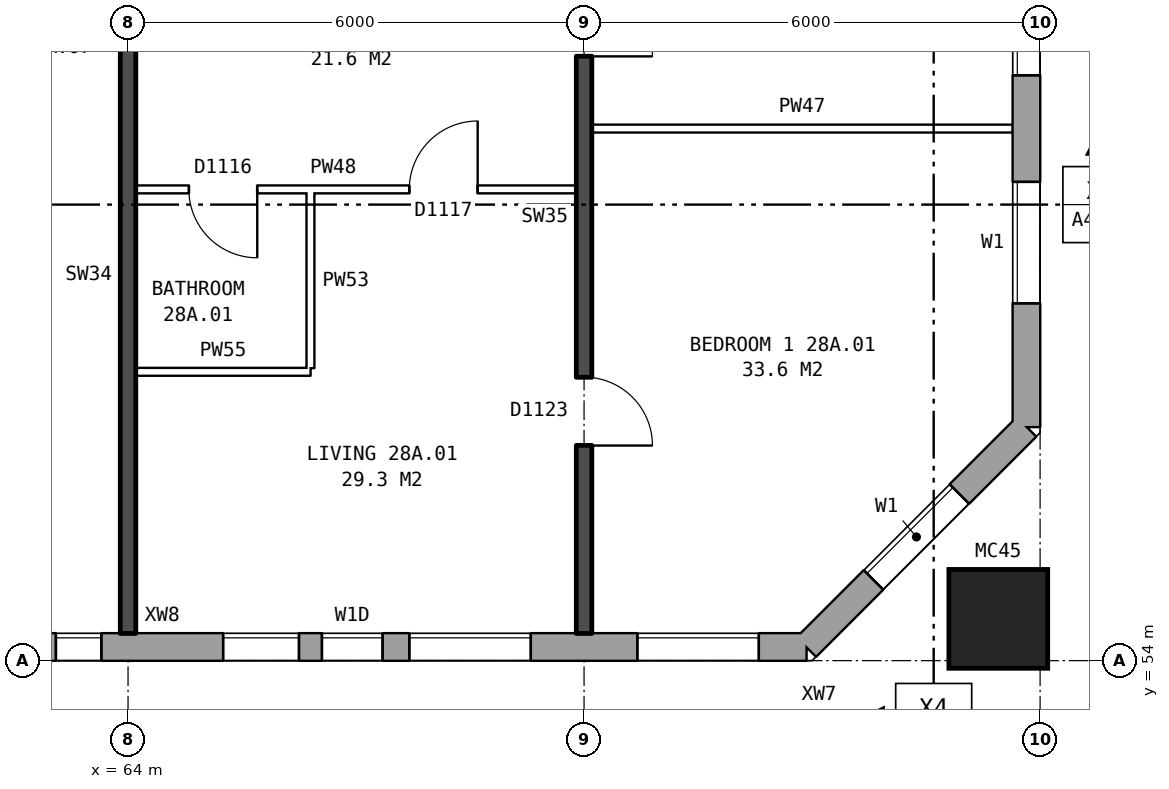
"""IFC4 building model, lengths in metres.
Left out: names, types, materials, properties, quantities, classifications, styles, units other than length and angle.
Written with IfcOpenShell. Run it as: python <this file> out.ifc"""

import sys

from ifc_helpers import new_model, si_unit, direction, frame, frame_2d, origin, origin_2d, place, context, subcontext, project, spatial, rectangle, hollow_rectangle, extrude, element, fill, save


model = new_model("IFC4")
c1 = context("Model", 3, precision=1e-05, world=origin(), true_north=direction((0.0, 1.0)))
c2 = subcontext(c1, "Body", "Model", "MODEL_VIEW")
j1 = project(units=[si_unit("LENGTHUNIT", "METRE"), si_unit("PLANEANGLEUNIT", "RADIAN")], contexts=[c1])
p1 = place(None, origin())
s1 = spatial("IfcSite", under=j1, at=p1, CompositionType="ELEMENT")
p2 = place(p1, origin())
s2 = spatial("IfcBuilding", under=s1, at=p2, CompositionType="ELEMENT")
p3 = place(p2, frame((0.0, 0.0, 102.6)))
s3 = spatial("IfcBuildingStorey", under=s2, at=p3, CompositionType="ELEMENT", Elevation=102.6)
p4 = place(p3, frame((75.45, 54.55, 0.0), z_axis=(0.0, 0.0, 1.0), x_axis=(1.0, 0.0, 0.0)))
e1 = element("IfcColumn", 1, at=p4, inside=s3, PredefinedType="COLUMN", context=c2, shape_type="SweptSolid", body=[
    extrude(hollow_rectangle(XDim=1.3, YDim=1.3, WallThickness=0.07, at=origin_2d()), origin(), (0.0, 0.0, 1.0), 3.1),
])
p5 = place(p3, frame((28.075, 54.18, 0.0), z_axis=(0.0, 0.0, 1.0), x_axis=(1.0, 0.0, 0.0)))
e2 = element("IfcWall", 2, at=p5, inside=s3, PredefinedType="STANDARD", context=c2, shape_type="SweptSolid", body=[
    extrude(rectangle(XDim=44.851, YDim=0.36, at=frame_2d((22.425, 0.0))), origin(), (0.0, 0.0, 1.0), 2.85),
])
p6 = place(p5, frame((0.625, 0.0, 0.8)))
e3 = element("IfcOpeningElement", 3, at=p6, cuts=e2, PredefinedType="OPENING", context=c2, shape_type="SweptSolid", body=[
    extrude(rectangle(XDim=1.6, YDim=1.8, at=frame_2d((0.8, 0.9))), frame((0.0, 0.19, 0.0), z_axis=(0.0, -1.0, 0.0), x_axis=(1.0, 0.0, 0.0)), (0.0, 0.0, 1.0), 0.38),
])
p7 = place(p5, frame((3.625, 0.0, 0.8)))
e4 = element("IfcOpeningElement", 4, at=p7, cuts=e2, PredefinedType="OPENING", context=c2, shape_type="SweptSolid", body=[
    extrude(rectangle(XDim=1.6, YDim=1.8, at=frame_2d((0.8, 0.9))), frame((0.0, 0.19, 0.0), z_axis=(0.0, -1.0, 0.0), x_axis=(1.0, 0.0, 0.0)), (0.0, 0.0, 1.0), 0.38),
])
p8 = place(p5, frame((6.125, 0.0, 1.0)))
e5 = element("IfcOpeningElement", 5, at=p8, cuts=e2, PredefinedType="OPENING", context=c2, shape_type="SweptSolid", body=[
    extrude(rectangle(XDim=0.6, YDim=1.5, at=frame_2d((0.3, 0.75))), frame((0.0, 0.19, 0.0), z_axis=(0.0, -1.0, 0.0), x_axis=(1.0, 0.0, 0.0)), (0.0, 0.0, 1.0), 0.38),
])
p9 = place(p5, frame((7.025, 0.0, 1.7)))
e6 = element("IfcOpeningElement", 6, at=p9, cuts=e2, PredefinedType="OPENING", context=c2, shape_type="SweptSolid", body=[
    extrude(rectangle(XDim=0.6, YDim=0.9, at=frame_2d((0.3, 0.45))), frame((0.0, 0.19, 0.0), z_axis=(0.0, -1.0, 0.0), x_axis=(1.0, 0.0, 0.0)), (0.0, 0.0, 1.0), 0.38),
])
p10 = place(p5, frame((12.625, 0.0, 0.8)))
e7 = element("IfcOpeningElement", 7, at=p10, cuts=e2, PredefinedType="OPENING", context=c2, shape_type="SweptSolid", body=[
    extrude(rectangle(XDim=1.6, YDim=1.8, at=frame_2d((0.8, 0.9))), frame((0.0, 0.19, 0.0), z_axis=(0.0, -1.0, 0.0), x_axis=(1.0, 0.0, 0.0)), (0.0, 0.0, 1.0), 0.38),
])
p11 = place(p5, frame((15.625, 0.0, 0.8)))
e8 = element("IfcOpeningElement", 8, at=p11, cuts=e2, PredefinedType="OPENING", context=c2, shape_type="SweptSolid", body=[
    extrude(rectangle(XDim=1.6, YDim=1.8, at=frame_2d((0.8, 0.9))), frame((0.0, 0.19, 0.0), z_axis=(0.0, -1.0, 0.0), x_axis=(1.0, 0.0, 0.0)), (0.0, 0.0, 1.0), 0.38),
])
p12 = place(p5, frame((18.625, 0.0, 0.8)))
e9 = element("IfcOpeningElement", 9, at=p12, cuts=e2, PredefinedType="OPENING", context=c2, shape_type="SweptSolid", body=[
    extrude(rectangle(XDim=1.6, YDim=1.8, at=frame_2d((0.8, 0.9))), frame((0.0, 0.19, 0.0), z_axis=(0.0, -1.0, 0.0), x_axis=(1.0, 0.0, 0.0)), (0.0, 0.0, 1.0), 0.38),
])
p13 = place(p5, frame((21.625, 0.0, 0.8)))
e10 = element("IfcOpeningElement", 10, at=p13, cuts=e2, PredefinedType="OPENING", context=c2, shape_type="SweptSolid", body=[
    extrude(rectangle(XDim=1.6, YDim=1.8, at=frame_2d((0.8, 0.9))), frame((0.0, 0.19, 0.0), z_axis=(0.0, -1.0, 0.0), x_axis=(1.0, 0.0, 0.0)), (0.0, 0.0, 1.0), 0.38),
])
p14 = place(p5, frame((24.625, 0.0, 0.8)))
e11 = element("IfcOpeningElement", 11, at=p14, cuts=e2, PredefinedType="OPENING", context=c2, shape_type="SweptSolid", body=[
    extrude(rectangle(XDim=1.6, YDim=1.8, at=frame_2d((0.8, 0.9))), frame((0.0, 0.19, 0.0), z_axis=(0.0, -1.0, 0.0), x_axis=(1.0, 0.0, 0.0)), (0.0, 0.0, 1.0), 0.38),
])
p15 = place(p5, frame((27.625, 0.0, 0.8)))
e12 = element("IfcOpeningElement", 12, at=p15, cuts=e2, PredefinedType="OPENING", context=c2, shape_type="SweptSolid", body=[
    extrude(rectangle(XDim=1.6, YDim=1.8, at=frame_2d((0.8, 0.9))), frame((0.0, 0.19, 0.0), z_axis=(0.0, -1.0, 0.0), x_axis=(1.0, 0.0, 0.0)), (0.0, 0.0, 1.0), 0.38),
])
p16 = place(p5, frame((30.625, 0.0, 0.8)))
e13 = element("IfcOpeningElement", 13, at=p16, cuts=e2, PredefinedType="OPENING", context=c2, shape_type="SweptSolid", body=[
    extrude(rectangle(XDim=1.6, YDim=1.8, at=frame_2d((0.8, 0.9))), frame((0.0, 0.19, 0.0), z_axis=(0.0, -1.0, 0.0), x_axis=(1.0, 0.0, 0.0)), (0.0, 0.0, 1.0), 0.38),
])
p17 = place(p5, frame((33.075, 0.0, 0.8)))
e14 = element("IfcOpeningElement", 14, at=p17, cuts=e2, PredefinedType="OPENING", context=c2, shape_type="SweptSolid", body=[
    extrude(rectangle(XDim=1.6, YDim=1.8, at=frame_2d((0.8, 0.9))), frame((0.0, 0.19, 0.0), z_axis=(0.0, -1.0, 0.0), x_axis=(1.0, 0.0, 0.0)), (0.0, 0.0, 1.0), 0.38),
])
p18 = place(p5, frame((37.175, 0.0, 1.7)))
e15 = element("IfcOpeningElement", 15, at=p18, cuts=e2, PredefinedType="OPENING", context=c2, shape_type="SweptSolid", body=[
    extrude(rectangle(XDim=1.0, YDim=0.9, at=frame_2d((0.5, 0.45))), frame((0.0, 0.19, 0.0), z_axis=(0.0, -1.0, 0.0), x_axis=(1.0, 0.0, 0.0)), (0.0, 0.0, 1.0), 0.38),
])
p19 = place(p5, frame((39.625, 0.0, 0.8)))
e16 = element("IfcOpeningElement", 16, at=p19, cuts=e2, PredefinedType="OPENING", context=c2, shape_type="SweptSolid", body=[
    extrude(rectangle(XDim=1.6, YDim=1.8, at=frame_2d((0.8, 0.9))), frame((0.0, 0.19, 0.0), z_axis=(0.0, -1.0, 0.0), x_axis=(1.0, 0.0, 0.0)), (0.0, 0.0, 1.0), 0.38),
])
p20 = place(p5, frame((42.625, 0.0, 0.8)))
e17 = element("IfcOpeningElement", 17, at=p20, cuts=e2, PredefinedType="OPENING", context=c2, shape_type="SweptSolid", body=[
    extrude(rectangle(XDim=1.6, YDim=1.8, at=frame_2d((0.8, 0.9))), frame((0.0, 0.19, 0.0), z_axis=(0.0, -1.0, 0.0), x_axis=(1.0, 0.0, 0.0)), (0.0, 0.0, 1.0), 0.38),
])
p21 = place(p5, frame((8.925, 0.0, 0.8)))
e18 = element("IfcOpeningElement", 18, at=p21, cuts=e2, PredefinedType="OPENING", context=c2, shape_type="SweptSolid", body=[
    extrude(rectangle(XDim=1.0, YDim=0.9, at=frame_2d((0.5, 0.45))), frame((0.0, 0.19, 0.0), z_axis=(0.0, -1.0, 0.0), x_axis=(1.0, 0.0, 0.0)), (0.0, 0.0, 1.0), 0.38),
])
p22 = place(p5, frame((10.225, 0.0, 0.8)))
e19 = element("IfcOpeningElement", 19, at=p22, cuts=e2, PredefinedType="OPENING", context=c2, shape_type="SweptSolid", body=[
    extrude(rectangle(XDim=1.4, YDim=1.8, at=frame_2d((0.7, 0.9))), frame((0.0, 0.19, 0.0), z_axis=(0.0, -1.0, 0.0), x_axis=(1.0, 0.0, 0.0)), (0.0, 0.0, 1.0), 0.38),
])
p23 = place(p5, frame((34.975, 0.0, 0.8)))
e20 = element("IfcOpeningElement", 20, at=p23, cuts=e2, PredefinedType="OPENING", context=c2, shape_type="SweptSolid", body=[
    extrude(rectangle(XDim=0.6, YDim=0.9, at=frame_2d((0.3, 0.45))), frame((0.0, 0.19, 0.0), z_axis=(0.0, -1.0, 0.0), x_axis=(1.0, 0.0, 0.0)), (0.0, 0.0, 1.0), 0.38),
])
p24 = place(p5, frame((38.475, 0.0, 0.8)))
e21 = element("IfcOpeningElement", 21, at=p24, cuts=e2, PredefinedType="OPENING", context=c2, shape_type="SweptSolid", body=[
    extrude(rectangle(XDim=0.8, YDim=1.8, at=frame_2d((0.4, 0.9))), frame((0.0, 0.19, 0.0), z_axis=(0.0, -1.0, 0.0), x_axis=(1.0, 0.0, 0.0)), (0.0, 0.0, 1.0), 0.38),
])
p25 = place(p3, frame((72.925, 54.18, 0.0), z_axis=(0.0, 0.0, 1.0), x_axis=(0.707106781187, 0.707106781187, 0.0)))
e22 = element("IfcWall", 22, at=p25, inside=s3, PredefinedType="STANDARD", context=c2, shape_type="SweptSolid", body=[
    extrude(rectangle(XDim=4.094, YDim=0.36, at=frame_2d((2.047, 0.0))), origin(), (0.0, 0.0, 1.0), 2.85),
])
p26 = place(p25, frame((1.247, 0.0, 0.8)))
e23 = element("IfcOpeningElement", 23, at=p26, cuts=e22, PredefinedType="OPENING", context=c2, shape_type="SweptSolid", body=[
    extrude(rectangle(XDim=1.6, YDim=1.8, at=frame_2d((0.8, 0.9))), frame((0.0, 0.19, 0.0), z_axis=(0.0, -1.0, 0.0), x_axis=(1.0, 0.0, 0.0)), (0.0, 0.0, 1.0), 0.38),
])
p27 = place(p3, frame((75.82, 57.075, 0.0), z_axis=(0.0, 0.0, 1.0), x_axis=(0.0, 1.0, 0.0)))
e24 = element("IfcWall", 24, at=p27, inside=s3, PredefinedType="STANDARD", context=c2, shape_type="SweptSolid", body=[
    extrude(rectangle(XDim=25.851, YDim=0.36, at=frame_2d((12.925, 0.0))), origin(), (0.0, 0.0, 1.0), 2.85),
])
p28 = place(p27, frame((1.625, 0.0, 0.8)))
e25 = element("IfcOpeningElement", 25, at=p28, cuts=e24, PredefinedType="OPENING", context=c2, shape_type="SweptSolid", body=[
    extrude(rectangle(XDim=1.6, YDim=1.8, at=frame_2d((0.8, 0.9))), frame((0.0, 0.19, 0.0), z_axis=(0.0, -1.0, 0.0), x_axis=(1.0, 0.0, 0.0)), (0.0, 0.0, 1.0), 0.38),
])
p29 = place(p27, frame((4.625, 0.0, 0.8)))
e26 = element("IfcOpeningElement", 26, at=p29, cuts=e24, PredefinedType="OPENING", context=c2, shape_type="SweptSolid", body=[
    extrude(rectangle(XDim=1.6, YDim=1.8, at=frame_2d((0.8, 0.9))), frame((0.0, 0.19, 0.0), z_axis=(0.0, -1.0, 0.0), x_axis=(1.0, 0.0, 0.0)), (0.0, 0.0, 1.0), 0.38),
])
p30 = place(p27, frame((19.625, 0.0, 0.8)))
e27 = element("IfcOpeningElement", 27, at=p30, cuts=e24, PredefinedType="OPENING", context=c2, shape_type="SweptSolid", body=[
    extrude(rectangle(XDim=1.6, YDim=1.8, at=frame_2d((0.8, 0.9))), frame((0.0, 0.19, 0.0), z_axis=(0.0, -1.0, 0.0), x_axis=(1.0, 0.0, 0.0)), (0.0, 0.0, 1.0), 0.38),
])
p31 = place(p27, frame((22.625, 0.0, 0.8)))
e28 = element("IfcOpeningElement", 28, at=p31, cuts=e24, PredefinedType="OPENING", context=c2, shape_type="SweptSolid", body=[
    extrude(rectangle(XDim=1.6, YDim=1.8, at=frame_2d((0.8, 0.9))), frame((0.0, 0.19, 0.0), z_axis=(0.0, -1.0, 0.0), x_axis=(1.0, 0.0, 0.0)), (0.0, 0.0, 1.0), 0.38),
])
p32 = place(p3, frame((64.1, 57.8, 0.0), z_axis=(0.0, 0.0, 1.0), x_axis=(1.0, 0.0, 0.0)))
e29 = element("IfcWall", 29, at=p32, inside=s3, PredefinedType="PARTITIONING", context=c2, shape_type="SweptSolid", body=[
    extrude(rectangle(XDim=2.3, YDim=0.1, at=frame_2d((1.15, 0.0))), origin(), (0.0, 0.0, 1.0), 2.85),
])
p33 = place(p3, frame((64.1, 60.2, 0.0), z_axis=(0.0, 0.0, 1.0), x_axis=(1.0, 0.0, 0.0)))
e30 = element("IfcWall", 30, at=p33, inside=s3, PredefinedType="PARTITIONING", context=c2, shape_type="SweptSolid", body=[
    extrude(rectangle(XDim=5.8, YDim=0.1, at=frame_2d((2.9, 0.0))), origin(), (0.0, 0.0, 1.0), 2.85),
])
p34 = place(p33, frame((3.6, 0.0, 0.0)))
e31 = element("IfcOpeningElement", 31, at=p34, cuts=e30, PredefinedType="OPENING", context=c2, shape_type="SweptSolid", body=[
    extrude(rectangle(XDim=0.9, YDim=2.1, at=frame_2d((0.45, 1.05))), frame((0.0, 0.06, 0.0), z_axis=(0.0, -1.0, 0.0), x_axis=(1.0, 0.0, 0.0)), (0.0, 0.0, 1.0), 0.12),
])
p35 = place(p33, frame((0.7, 0.0, 0.0)))
e32 = element("IfcOpeningElement", 32, at=p35, cuts=e30, PredefinedType="OPENING", context=c2, shape_type="SweptSolid", body=[
    extrude(rectangle(XDim=0.9, YDim=2.1, at=frame_2d((0.45, 1.05))), frame((0.0, 0.06, 0.0), z_axis=(0.0, -1.0, 0.0), x_axis=(1.0, 0.0, 0.0)), (0.0, 0.0, 1.0), 0.12),
])
p36 = place(p3, frame((70.1, 61.0, 0.0), z_axis=(0.0, 0.0, 1.0), x_axis=(1.0, 0.0, 0.0)))
e33 = element("IfcWall", 33, at=p36, inside=s3, PredefinedType="PARTITIONING", context=c2, shape_type="SweptSolid", body=[
    extrude(rectangle(XDim=5.54, YDim=0.1, at=frame_2d((2.77, 0.0))), origin(), (0.0, 0.0, 1.0), 2.85),
])
p37 = place(p3, frame((64.0, 54.36, 0.0), z_axis=(0.0, 0.0, 1.0), x_axis=(0.0, 1.0, 0.0)))
e34 = element("IfcWall", 34, at=p37, inside=s3, PredefinedType="SOLIDWALL", context=c2, shape_type="SweptSolid", body=[
    extrude(rectangle(XDim=9.44, YDim=0.2, at=frame_2d((4.72, 0.0))), origin(), (0.0, 0.0, 1.0), 2.85),
])
p38 = place(p3, frame((66.4, 57.85, 0.0), z_axis=(0.0, 0.0, 1.0), x_axis=(0.0, 1.0, 0.0)))
e35 = element("IfcWall", 35, at=p38, inside=s3, PredefinedType="PARTITIONING", context=c2, shape_type="SweptSolid", body=[
    extrude(rectangle(XDim=2.3, YDim=0.1, at=frame_2d((1.15, 0.0))), origin(), (0.0, 0.0, 1.0), 2.85),
])
p39 = place(p3, frame((70.0, 54.36, 0.0), z_axis=(0.0, 0.0, 1.0), x_axis=(0.0, 1.0, 0.0)))
e36 = element("IfcWall", 36, at=p39, inside=s3, PredefinedType="SOLIDWALL", context=c2, shape_type="SweptSolid", body=[
    extrude(rectangle(XDim=9.44, YDim=0.2, at=frame_2d((4.72, 0.0))), origin(), (0.0, 0.0, 1.0), 2.85),
])
p40 = place(p39, frame((2.47, 0.0, 0.0)))
e37 = element("IfcOpeningElement", 37, at=p40, cuts=e36, PredefinedType="OPENING", context=c2, shape_type="SweptSolid", body=[
    extrude(rectangle(XDim=0.9, YDim=2.1, at=frame_2d((0.45, 1.05))), frame((0.0, 0.11, 0.0), z_axis=(0.0, -1.0, 0.0), x_axis=(1.0, 0.0, 0.0)), (0.0, 0.0, 1.0), 0.22),
])
p41 = place(p39, frame((7.59, 0.0, 0.0)))
e38 = element("IfcOpeningElement", 38, at=p41, cuts=e36, PredefinedType="OPENING", context=c2, shape_type="SweptSolid", body=[
    extrude(rectangle(XDim=0.9, YDim=2.1, at=frame_2d((0.45, 1.05))), frame((0.0, 0.11, 0.0), z_axis=(0.0, -1.0, 0.0), x_axis=(1.0, 0.0, 0.0)), (0.0, 0.0, 1.0), 0.22),
])
p42 = place(p18, origin())
e39 = element("IfcWindow", 39, at=p42, inside=s3, PartitioningType="SINGLE_PANEL", PredefinedType="WINDOW", context=c2, shape_type="SweptSolid", body=[
    extrude(rectangle(XDim=1.0, YDim=0.9, at=frame_2d((0.5, 0.45))), frame((0.0, 0.15, 0.0), z_axis=(0.0, -1.0, 0.0), x_axis=(1.0, 0.0, 0.0)), (0.0, 0.0, 1.0), 0.06),
])
fill(e15, e39)
p43 = place(p19, origin())
e40 = element("IfcWindow", 40, at=p43, inside=s3, PartitioningType="SINGLE_PANEL", PredefinedType="WINDOW", context=c2, shape_type="SweptSolid", body=[
    extrude(rectangle(XDim=1.6, YDim=1.8, at=frame_2d((0.8, 0.9))), frame((0.0, 0.15, 0.0), z_axis=(0.0, -1.0, 0.0), x_axis=(1.0, 0.0, 0.0)), (0.0, 0.0, 1.0), 0.06),
])
fill(e16, e40)
p44 = place(p20, origin())
e41 = element("IfcWindow", 41, at=p44, inside=s3, PartitioningType="SINGLE_PANEL", PredefinedType="WINDOW", context=c2, shape_type="SweptSolid", body=[
    extrude(rectangle(XDim=1.6, YDim=1.8, at=frame_2d((0.8, 0.9))), frame((0.0, 0.15, 0.0), z_axis=(0.0, -1.0, 0.0), x_axis=(1.0, 0.0, 0.0)), (0.0, 0.0, 1.0), 0.06),
])
fill(e17, e41)
p45 = place(p26, origin())
e42 = element("IfcWindow", 42, at=p45, inside=s3, PartitioningType="SINGLE_PANEL", PredefinedType="WINDOW", context=c2, shape_type="SweptSolid", body=[
    extrude(rectangle(XDim=1.6, YDim=1.8, at=frame_2d((0.8, 0.9))), frame((0.0, 0.15, 0.0), z_axis=(0.0, -1.0, 0.0), x_axis=(1.0, 0.0, 0.0)), (0.0, 0.0, 1.0), 0.06),
])
fill(e23, e42)
p46 = place(p28, origin())
e43 = element("IfcWindow", 43, at=p46, inside=s3, PartitioningType="SINGLE_PANEL", PredefinedType="WINDOW", context=c2, shape_type="SweptSolid", body=[
    extrude(rectangle(XDim=1.6, YDim=1.8, at=frame_2d((0.8, 0.9))), frame((0.0, 0.15, 0.0), z_axis=(0.0, -1.0, 0.0), x_axis=(1.0, 0.0, 0.0)), (0.0, 0.0, 1.0), 0.06),
])
fill(e25, e43)
p47 = place(p29, origin())
e44 = element("IfcWindow", 44, at=p47, inside=s3, PartitioningType="SINGLE_PANEL", PredefinedType="WINDOW", context=c2, shape_type="SweptSolid", body=[
    extrude(rectangle(XDim=1.6, YDim=1.8, at=frame_2d((0.8, 0.9))), frame((0.0, 0.15, 0.0), z_axis=(0.0, -1.0, 0.0), x_axis=(1.0, 0.0, 0.0)), (0.0, 0.0, 1.0), 0.06),
])
fill(e26, e44)
p48 = place(p40, frame((0.9, 0.0, 0.0), z_axis=(0.0, 0.0, 1.0), x_axis=(-1.0, 0.0, 0.0)))
e45 = element("IfcDoor", 45, at=p48, inside=s3, OperationType="SINGLE_SWING_RIGHT", PredefinedType="DOOR", context=c2, shape_type="SweptSolid", body=[
    extrude(rectangle(XDim=0.9, YDim=2.1, at=frame_2d((0.45, 1.05))), frame((0.0, 0.025, 0.0), z_axis=(0.0, -1.0, 0.0), x_axis=(1.0, 0.0, 0.0)), (0.0, 0.0, 1.0), 0.05),
])
fill(e37, e45)
p49 = place(p41, frame((0.9, 0.0, 0.0), z_axis=(0.0, 0.0, 1.0), x_axis=(-1.0, 0.0, 0.0)))
e46 = element("IfcDoor", 46, at=p49, inside=s3, OperationType="SINGLE_SWING_RIGHT", PredefinedType="DOOR", context=c2, shape_type="SweptSolid", body=[
    extrude(rectangle(XDim=0.9, YDim=2.1, at=frame_2d((0.45, 1.05))), frame((0.0, 0.025, 0.0), z_axis=(0.0, -1.0, 0.0), x_axis=(1.0, 0.0, 0.0)), (0.0, 0.0, 1.0), 0.05),
])
fill(e38, e46)
p50 = place(p34, origin())
e47 = element("IfcDoor", 47, at=p50, inside=s3, OperationType="SINGLE_SWING_RIGHT", PredefinedType="DOOR", context=c2, shape_type="SweptSolid", body=[
    extrude(rectangle(XDim=0.9, YDim=2.1, at=frame_2d((0.45, 1.05))), frame((0.0, 0.025, 0.0), z_axis=(0.0, -1.0, 0.0), x_axis=(1.0, 0.0, 0.0)), (0.0, 0.0, 1.0), 0.05),
])
fill(e31, e47)
p51 = place(p35, frame((0.9, 0.0, 0.0), z_axis=(0.0, 0.0, 1.0), x_axis=(-1.0, 0.0, 0.0)))
e48 = element("IfcDoor", 48, at=p51, inside=s3, OperationType="SINGLE_SWING_LEFT", PredefinedType="DOOR", context=c2, shape_type="SweptSolid", body=[
    extrude(rectangle(XDim=0.9, YDim=2.1, at=frame_2d((0.45, 1.05))), frame((0.0, 0.025, 0.0), z_axis=(0.0, -1.0, 0.0), x_axis=(1.0, 0.0, 0.0)), (0.0, 0.0, 1.0), 0.05),
])
fill(e32, e48)
p52 = place(p23, origin())
e49 = element("IfcWindow", 49, at=p52, inside=s3, PartitioningType="SINGLE_PANEL", PredefinedType="WINDOW", context=c2, shape_type="SweptSolid", body=[
    extrude(rectangle(XDim=0.6, YDim=0.9, at=frame_2d((0.3, 0.45))), frame((0.0, 0.15, 0.0), z_axis=(0.0, -1.0, 0.0), x_axis=(1.0, 0.0, 0.0)), (0.0, 0.0, 1.0), 0.06),
])
fill(e20, e49)
p53 = place(p24, origin())
e50 = element("IfcWindow", 50, at=p53, inside=s3, PartitioningType="SINGLE_PANEL", PredefinedType="WINDOW", context=c2, shape_type="SweptSolid", body=[
    extrude(rectangle(XDim=0.8, YDim=1.8, at=frame_2d((0.4, 0.9))), frame((0.0, 0.15, 0.0), z_axis=(0.0, -1.0, 0.0), x_axis=(1.0, 0.0, 0.0)), (0.0, 0.0, 1.0), 0.06),
])
fill(e21, e50)
save(model, sys.argv[1])
